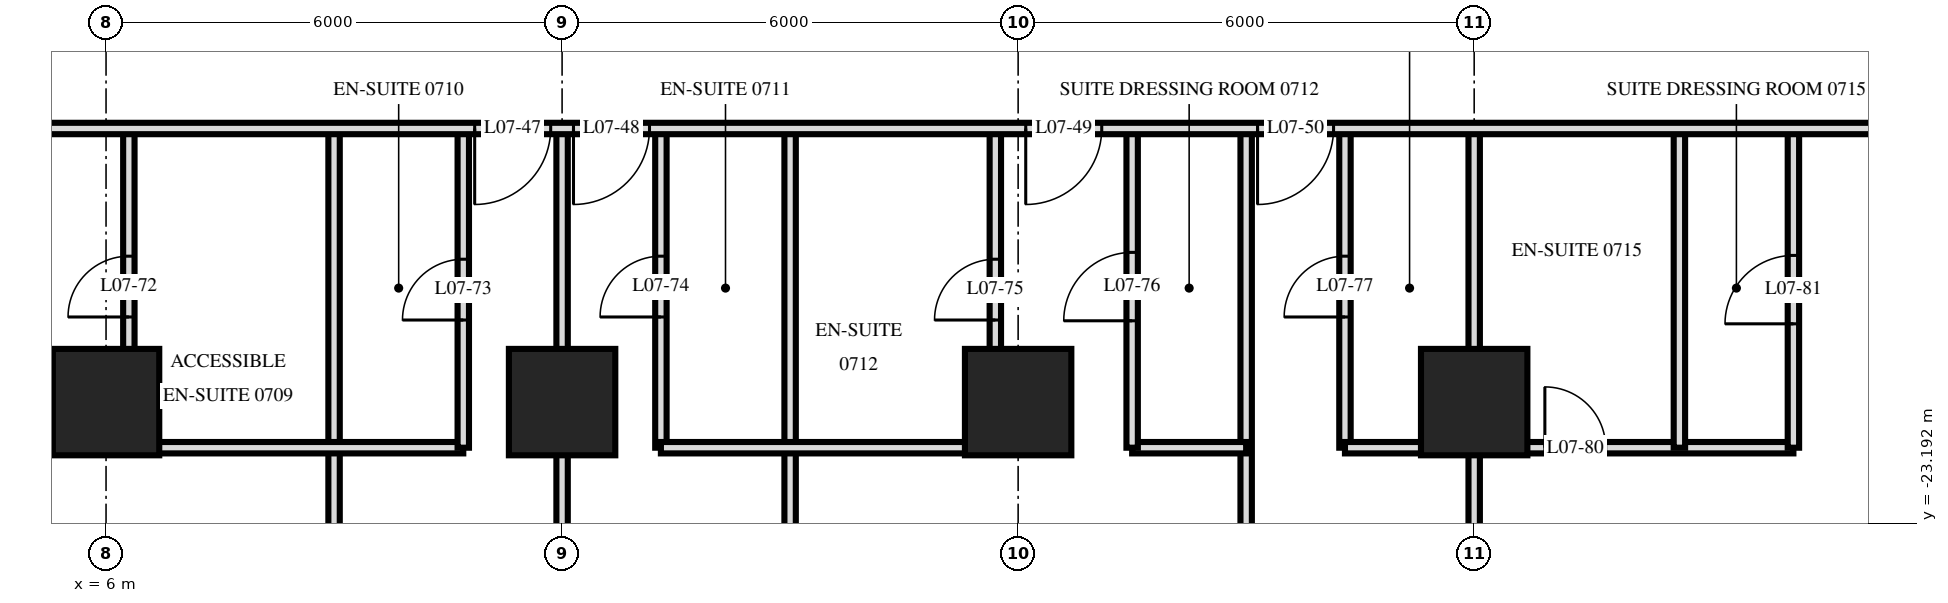
"""IFC4 building model, lengths in metres.
Left out: names, types, materials, properties, quantities, classifications, styles, units other than length and angle.
Written with IfcOpenShell. Run it as: python <this file> out.ifc"""

import sys

from ifc_helpers import new_model, si_unit, direction, frame, frame_2d, origin, origin_2d, place, context, subcontext, project, spatial, rectangle, extrude, element, fill, save


model = new_model("IFC4")
c1 = context("Model", 3, precision=1e-05, world=origin(), true_north=direction((0.0, 1.0)))
c2 = subcontext(c1, "Body", "Model", "MODEL_VIEW")
j1 = project(units=[si_unit("LENGTHUNIT", "METRE"), si_unit("PLANEANGLEUNIT", "RADIAN")], contexts=[c1])
p1 = place(None, origin())
s1 = spatial("IfcSite", under=j1, at=p1, CompositionType="ELEMENT")
p2 = place(p1, origin())
s2 = spatial("IfcBuilding", under=s1, at=p2, CompositionType="ELEMENT")
p3 = place(p2, frame((0.0, 0.0, 34.8)))
s3 = spatial("IfcBuildingStorey", under=s2, at=p3, CompositionType="ELEMENT", Elevation=34.8)
for number, where, z_axis, x_axis in (
    (1, (6.0, -21.6, 0.0), (0.0, 0.0, 1.0), (1.0, 0.0, 0.0)),
    (2, (12.0, -21.6, 0.0), (0.0, 0.0, 1.0), (1.0, 0.0, 0.0)),
    (3, (18.0, -21.6, 0.0), (0.0, 0.0, 1.0), (1.0, 0.0, 0.0)),
    (4, (24.0, -21.6, 0.0), (0.0, 0.0, 1.0), (1.0, 0.0, 0.0)),
):
    element("IfcColumn", number, at=place(p3, frame(where, z_axis=z_axis, x_axis=x_axis)), inside=s3, PredefinedType="COLUMN", context=c2, shape_type="SweptSolid", body=[
        extrude(rectangle(XDim=1.4, YDim=1.4, at=origin_2d()), origin(), (0.0, 0.0, 1.0), 3.6),
    ])
p4 = place(p3, frame((28.2, -22.2, 0.0), z_axis=(0.0, 0.0, 1.0), x_axis=(0.0, 1.0, 0.0)))
e5 = element("IfcWall", 5, at=p4, inside=s3, PredefinedType="PARTITIONING", context=c2, shape_type="SweptSolid", body=[
    extrude(rectangle(XDim=4.2, YDim=0.15, at=frame_2d((2.1, 0.0))), origin(), (0.0, 0.0, 1.0), 3.32),
])
p5 = place(p4, frame((1.63, 0.0, 0.0)))
e6 = element("IfcOpeningElement", 6, at=p5, cuts=e5, PredefinedType="OPENING", context=c2, shape_type="SweptSolid", body=[
    extrude(rectangle(XDim=0.9, YDim=2.1, at=frame_2d((0.45, 1.05))), frame((0.0, 0.085, 0.0), z_axis=(0.0, -1.0, 0.0), x_axis=(1.0, 0.0, 0.0)), (0.0, 0.0, 1.0), 0.17),
])
p6 = place(p3, frame((26.7, -22.2, 0.0), z_axis=(0.0, 0.0, 1.0), x_axis=(0.0, 1.0, 0.0)))
e7 = element("IfcWall", 7, at=p6, inside=s3, PredefinedType="PARTITIONING", context=c2, shape_type="SweptSolid", body=[
    extrude(rectangle(XDim=4.2, YDim=0.15, at=frame_2d((2.1, 0.0))), origin(), (0.0, 0.0, 1.0), 3.32),
])
p7 = place(p3, frame((24.0, -29.22, 0.0), z_axis=(0.0, 0.0, 1.0), x_axis=(0.0, 1.0, 0.0)))
e8 = element("IfcWall", 8, at=p7, inside=s3, PredefinedType="PARTITIONING", context=c2, shape_type="SweptSolid", body=[
    extrude(rectangle(XDim=11.22, YDim=0.15, at=frame_2d((5.61, 0.0))), origin(), (0.0, 0.0, 1.0), 3.32),
])
p8 = place(p3, frame((22.3, -22.2, 0.0), z_axis=(0.0, 0.0, 1.0), x_axis=(0.0, 1.0, 0.0)))
e9 = element("IfcWall", 9, at=p8, inside=s3, PredefinedType="PARTITIONING", context=c2, shape_type="SweptSolid", body=[
    extrude(rectangle(XDim=4.2, YDim=0.15, at=frame_2d((2.1, 0.0))), origin(), (0.0, 0.0, 1.0), 3.32),
])
p9 = place(p8, frame((1.72, 0.0, 0.0)))
e10 = element("IfcOpeningElement", 10, at=p9, cuts=e9, PredefinedType="OPENING", context=c2, shape_type="SweptSolid", body=[
    extrude(rectangle(XDim=0.8, YDim=2.1, at=frame_2d((0.4, 1.05))), frame((0.0, 0.085, 0.0), z_axis=(0.0, -1.0, 0.0), x_axis=(1.0, 0.0, 0.0)), (0.0, 0.0, 1.0), 0.17),
])
p10 = place(p3, frame((21.0, -29.22, 0.0), z_axis=(0.0, 0.0, 1.0), x_axis=(0.0, 1.0, 0.0)))
e11 = element("IfcWall", 11, at=p10, inside=s3, PredefinedType="PARTITIONING", context=c2, shape_type="SweptSolid", body=[
    extrude(rectangle(XDim=11.22, YDim=0.15, at=frame_2d((5.61, 0.0))), origin(), (0.0, 0.0, 1.0), 3.32),
])
p11 = place(p3, frame((19.5, -22.2, 0.0), z_axis=(0.0, 0.0, 1.0), x_axis=(0.0, 1.0, 0.0)))
e12 = element("IfcWall", 12, at=p11, inside=s3, PredefinedType="PARTITIONING", context=c2, shape_type="SweptSolid", body=[
    extrude(rectangle(XDim=4.2, YDim=0.15, at=frame_2d((2.1, 0.0))), origin(), (0.0, 0.0, 1.0), 3.32),
])
p12 = place(p11, frame((1.67, 0.0, 0.0)))
e13 = element("IfcOpeningElement", 13, at=p12, cuts=e12, PredefinedType="OPENING", context=c2, shape_type="SweptSolid", body=[
    extrude(rectangle(XDim=0.9, YDim=2.1, at=frame_2d((0.45, 1.05))), frame((0.0, 0.085, 0.0), z_axis=(0.0, -1.0, 0.0), x_axis=(1.0, 0.0, 0.0)), (0.0, 0.0, 1.0), 0.17),
])
p13 = place(p3, frame((17.7, -22.2, 0.0), z_axis=(0.0, 0.0, 1.0), x_axis=(0.0, 1.0, 0.0)))
e14 = element("IfcWall", 14, at=p13, inside=s3, PredefinedType="PARTITIONING", context=c2, shape_type="SweptSolid", body=[
    extrude(rectangle(XDim=4.2, YDim=0.15, at=frame_2d((2.1, 0.0))), origin(), (0.0, 0.0, 1.0), 3.32),
])
p14 = place(p13, frame((1.68, 0.0, 0.0)))
e15 = element("IfcOpeningElement", 15, at=p14, cuts=e14, PredefinedType="OPENING", context=c2, shape_type="SweptSolid", body=[
    extrude(rectangle(XDim=0.8, YDim=2.1, at=frame_2d((0.4, 1.05))), frame((0.0, 0.085, 0.0), z_axis=(0.0, -1.0, 0.0), x_axis=(1.0, 0.0, 0.0)), (0.0, 0.0, 1.0), 0.17),
])
p15 = place(p3, frame((15.0, -29.22, 0.0), z_axis=(0.0, 0.0, 1.0), x_axis=(0.0, 1.0, 0.0)))
e16 = element("IfcWall", 16, at=p15, inside=s3, PredefinedType="PARTITIONING", context=c2, shape_type="SweptSolid", body=[
    extrude(rectangle(XDim=11.22, YDim=0.15, at=frame_2d((5.61, 0.0))), origin(), (0.0, 0.0, 1.0), 3.32),
])
p16 = place(p3, frame((13.3, -22.2, 0.0), z_axis=(0.0, 0.0, 1.0), x_axis=(0.0, 1.0, 0.0)))
e17 = element("IfcWall", 17, at=p16, inside=s3, PredefinedType="PARTITIONING", context=c2, shape_type="SweptSolid", body=[
    extrude(rectangle(XDim=4.2, YDim=0.15, at=frame_2d((2.1, 0.0))), origin(), (0.0, 0.0, 1.0), 3.32),
])
p17 = place(p16, frame((1.72, 0.0, 0.0)))
e18 = element("IfcOpeningElement", 18, at=p17, cuts=e17, PredefinedType="OPENING", context=c2, shape_type="SweptSolid", body=[
    extrude(rectangle(XDim=0.8, YDim=2.1, at=frame_2d((0.4, 1.05))), frame((0.0, 0.085, 0.0), z_axis=(0.0, -1.0, 0.0), x_axis=(1.0, 0.0, 0.0)), (0.0, 0.0, 1.0), 0.17),
])
p18 = place(p3, frame((12.0, -29.22, 0.0), z_axis=(0.0, 0.0, 1.0), x_axis=(0.0, 1.0, 0.0)))
e19 = element("IfcWall", 19, at=p18, inside=s3, PredefinedType="PARTITIONING", context=c2, shape_type="SweptSolid", body=[
    extrude(rectangle(XDim=11.22, YDim=0.15, at=frame_2d((5.61, 0.0))), origin(), (0.0, 0.0, 1.0), 3.32),
])
p19 = place(p3, frame((10.7, -22.2, 0.0), z_axis=(0.0, 0.0, 1.0), x_axis=(0.0, 1.0, 0.0)))
e20 = element("IfcWall", 20, at=p19, inside=s3, PredefinedType="PARTITIONING", context=c2, shape_type="SweptSolid", body=[
    extrude(rectangle(XDim=4.2, YDim=0.15, at=frame_2d((2.1, 0.0))), origin(), (0.0, 0.0, 1.0), 3.32),
])
p20 = place(p19, frame((1.68, 0.0, 0.0)))
e21 = element("IfcOpeningElement", 21, at=p20, cuts=e20, PredefinedType="OPENING", context=c2, shape_type="SweptSolid", body=[
    extrude(rectangle(XDim=0.8, YDim=2.1, at=frame_2d((0.4, 1.05))), frame((0.0, 0.085, 0.0), z_axis=(0.0, -1.0, 0.0), x_axis=(1.0, 0.0, 0.0)), (0.0, 0.0, 1.0), 0.17),
])
p21 = place(p3, frame((9.0, -29.22, 0.0), z_axis=(0.0, 0.0, 1.0), x_axis=(0.0, 1.0, 0.0)))
e22 = element("IfcWall", 22, at=p21, inside=s3, PredefinedType="PARTITIONING", context=c2, shape_type="SweptSolid", body=[
    extrude(rectangle(XDim=11.22, YDim=0.15, at=frame_2d((5.61, 0.0))), origin(), (0.0, 0.0, 1.0), 3.32),
])
p22 = place(p3, frame((6.3, -22.2, 0.0), z_axis=(0.0, 0.0, 1.0), x_axis=(0.0, 1.0, 0.0)))
e23 = element("IfcWall", 23, at=p22, inside=s3, PredefinedType="PARTITIONING", context=c2, shape_type="SweptSolid", body=[
    extrude(rectangle(XDim=4.2, YDim=0.15, at=frame_2d((2.1, 0.0))), origin(), (0.0, 0.0, 1.0), 3.32),
])
p23 = place(p22, frame((1.72, 0.0, 0.0)))
e24 = element("IfcOpeningElement", 24, at=p23, cuts=e23, PredefinedType="OPENING", context=c2, shape_type="SweptSolid", body=[
    extrude(rectangle(XDim=0.8, YDim=2.1, at=frame_2d((0.4, 1.05))), frame((0.0, 0.085, 0.0), z_axis=(0.0, -1.0, 0.0), x_axis=(1.0, 0.0, 0.0)), (0.0, 0.0, 1.0), 0.17),
])
for number, where, z_axis, x_axis in (
    (25, (6.3, -22.2, 0.0), (0.0, 0.0, 1.0), (1.0, 0.0, 0.0)),
    (26, (13.3, -22.2, 0.0), (0.0, 0.0, 1.0), (1.0, 0.0, 0.0)),
):
    element("IfcWall", number, at=place(p3, frame(where, z_axis=z_axis, x_axis=x_axis)), inside=s3, PredefinedType="PARTITIONING", context=c2, shape_type="SweptSolid", body=[
        extrude(rectangle(XDim=4.4, YDim=0.15, at=frame_2d((2.2, 0.0))), origin(), (0.0, 0.0, 1.0), 3.32),
    ])
p24 = place(p3, frame((19.5, -22.2, 0.0), z_axis=(0.0, 0.0, 1.0), x_axis=(1.0, 0.0, 0.0)))
e27 = element("IfcWall", 27, at=p24, inside=s3, PredefinedType="PARTITIONING", context=c2, shape_type="SweptSolid", body=[
    extrude(rectangle(XDim=1.5, YDim=0.15, at=frame_2d((0.75, 0.0))), origin(), (0.0, 0.0, 1.0), 3.32),
])
p25 = place(p3, frame((22.3, -22.2, 0.0), z_axis=(0.0, 0.0, 1.0), x_axis=(1.0, 0.0, 0.0)))
e28 = element("IfcWall", 28, at=p25, inside=s3, PredefinedType="PARTITIONING", context=c2, shape_type="SweptSolid", body=[
    extrude(rectangle(XDim=5.9, YDim=0.15, at=frame_2d((2.95, 0.0))), origin(), (0.0, 0.0, 1.0), 3.32),
])
p26 = place(p25, frame((2.63, 0.0, 0.0)))
e29 = element("IfcOpeningElement", 29, at=p26, cuts=e28, PredefinedType="OPENING", context=c2, shape_type="SweptSolid", body=[
    extrude(rectangle(XDim=0.8, YDim=2.1, at=frame_2d((0.4, 1.05))), frame((0.0, 0.085, 0.0), z_axis=(0.0, -1.0, 0.0), x_axis=(1.0, 0.0, 0.0)), (0.0, 0.0, 1.0), 0.17),
])
p27 = place(p3, frame((-33.12, -18.0, 0.0), z_axis=(0.0, 0.0, 1.0), x_axis=(1.0, 0.0, 0.0)))
e30 = element("IfcWall", 30, at=p27, inside=s3, PredefinedType="PARTITIONING", context=c2, shape_type="SweptSolid", body=[
    extrude(rectangle(XDim=66.24, YDim=0.15, at=frame_2d((33.12, 0.0))), origin(), (0.0, 0.0, 1.0), 3.32),
])
p28 = place(p27, frame((12.27, 0.0, 0.0)))
e31 = element("IfcOpeningElement", 31, at=p28, cuts=e30, PredefinedType="OPENING", context=c2, shape_type="SweptSolid", body=[
    extrude(rectangle(XDim=1.0, YDim=2.1, at=frame_2d((0.5, 1.05))), frame((0.0, 0.085, 0.0), z_axis=(0.0, -1.0, 0.0), x_axis=(1.0, 0.0, 0.0)), (0.0, 0.0, 1.0), 0.17),
])
p29 = place(p27, frame((16.97, 0.0, 0.0)))
e32 = element("IfcOpeningElement", 32, at=p29, cuts=e30, PredefinedType="OPENING", context=c2, shape_type="SweptSolid", body=[
    extrude(rectangle(XDim=1.0, YDim=2.1, at=frame_2d((0.5, 1.05))), frame((0.0, 0.085, 0.0), z_axis=(0.0, -1.0, 0.0), x_axis=(1.0, 0.0, 0.0)), (0.0, 0.0, 1.0), 0.17),
])
p30 = place(p27, frame((18.27, 0.0, 0.0)))
e33 = element("IfcOpeningElement", 33, at=p30, cuts=e30, PredefinedType="OPENING", context=c2, shape_type="SweptSolid", body=[
    extrude(rectangle(XDim=1.0, YDim=2.1, at=frame_2d((0.5, 1.05))), frame((0.0, 0.085, 0.0), z_axis=(0.0, -1.0, 0.0), x_axis=(1.0, 0.0, 0.0)), (0.0, 0.0, 1.0), 0.17),
])
p31 = place(p27, frame((22.97, 0.0, 0.0)))
e34 = element("IfcOpeningElement", 34, at=p31, cuts=e30, PredefinedType="OPENING", context=c2, shape_type="SweptSolid", body=[
    extrude(rectangle(XDim=1.0, YDim=2.1, at=frame_2d((0.5, 1.05))), frame((0.0, 0.085, 0.0), z_axis=(0.0, -1.0, 0.0), x_axis=(1.0, 0.0, 0.0)), (0.0, 0.0, 1.0), 0.17),
])
p32 = place(p27, frame((24.27, 0.0, 0.0)))
e35 = element("IfcOpeningElement", 35, at=p32, cuts=e30, PredefinedType="OPENING", context=c2, shape_type="SweptSolid", body=[
    extrude(rectangle(XDim=1.0, YDim=2.1, at=frame_2d((0.5, 1.05))), frame((0.0, 0.085, 0.0), z_axis=(0.0, -1.0, 0.0), x_axis=(1.0, 0.0, 0.0)), (0.0, 0.0, 1.0), 0.17),
])
p33 = place(p27, frame((28.97, 0.0, 0.0)))
e36 = element("IfcOpeningElement", 36, at=p33, cuts=e30, PredefinedType="OPENING", context=c2, shape_type="SweptSolid", body=[
    extrude(rectangle(XDim=1.0, YDim=2.1, at=frame_2d((0.5, 1.05))), frame((0.0, 0.085, 0.0), z_axis=(0.0, -1.0, 0.0), x_axis=(1.0, 0.0, 0.0)), (0.0, 0.0, 1.0), 0.17),
])
p34 = place(p27, frame((30.27, 0.0, 0.0)))
e37 = element("IfcOpeningElement", 37, at=p34, cuts=e30, PredefinedType="OPENING", context=c2, shape_type="SweptSolid", body=[
    extrude(rectangle(XDim=1.0, YDim=2.1, at=frame_2d((0.5, 1.05))), frame((0.0, 0.085, 0.0), z_axis=(0.0, -1.0, 0.0), x_axis=(1.0, 0.0, 0.0)), (0.0, 0.0, 1.0), 0.17),
])
p35 = place(p27, frame((34.97, 0.0, 0.0)))
e38 = element("IfcOpeningElement", 38, at=p35, cuts=e30, PredefinedType="OPENING", context=c2, shape_type="SweptSolid", body=[
    extrude(rectangle(XDim=1.0, YDim=2.1, at=frame_2d((0.5, 1.05))), frame((0.0, 0.085, 0.0), z_axis=(0.0, -1.0, 0.0), x_axis=(1.0, 0.0, 0.0)), (0.0, 0.0, 1.0), 0.17),
])
p36 = place(p27, frame((37.27, 0.0, 0.0)))
e39 = element("IfcOpeningElement", 39, at=p36, cuts=e30, PredefinedType="OPENING", context=c2, shape_type="SweptSolid", body=[
    extrude(rectangle(XDim=1.0, YDim=2.1, at=frame_2d((0.5, 1.05))), frame((0.0, 0.085, 0.0), z_axis=(0.0, -1.0, 0.0), x_axis=(1.0, 0.0, 0.0)), (0.0, 0.0, 1.0), 0.17),
])
p37 = place(p27, frame((43.97, 0.0, 0.0)))
e40 = element("IfcOpeningElement", 40, at=p37, cuts=e30, PredefinedType="OPENING", context=c2, shape_type="SweptSolid", body=[
    extrude(rectangle(XDim=1.0, YDim=2.1, at=frame_2d((0.5, 1.05))), frame((0.0, 0.085, 0.0), z_axis=(0.0, -1.0, 0.0), x_axis=(1.0, 0.0, 0.0)), (0.0, 0.0, 1.0), 0.17),
])
p38 = place(p27, frame((45.27, 0.0, 0.0)))
e41 = element("IfcOpeningElement", 41, at=p38, cuts=e30, PredefinedType="OPENING", context=c2, shape_type="SweptSolid", body=[
    extrude(rectangle(XDim=1.0, YDim=2.1, at=frame_2d((0.5, 1.05))), frame((0.0, 0.085, 0.0), z_axis=(0.0, -1.0, 0.0), x_axis=(1.0, 0.0, 0.0)), (0.0, 0.0, 1.0), 0.17),
])
p39 = place(p27, frame((51.22, 0.0, 0.0)))
e42 = element("IfcOpeningElement", 42, at=p39, cuts=e30, PredefinedType="OPENING", context=c2, shape_type="SweptSolid", body=[
    extrude(rectangle(XDim=1.0, YDim=2.1, at=frame_2d((0.5, 1.05))), frame((0.0, 0.085, 0.0), z_axis=(0.0, -1.0, 0.0), x_axis=(1.0, 0.0, 0.0)), (0.0, 0.0, 1.0), 0.17),
])
p40 = place(p27, frame((54.27, 0.0, 0.0)))
e43 = element("IfcOpeningElement", 43, at=p40, cuts=e30, PredefinedType="OPENING", context=c2, shape_type="SweptSolid", body=[
    extrude(rectangle(XDim=1.0, YDim=2.1, at=frame_2d((0.5, 1.05))), frame((0.0, 0.085, 0.0), z_axis=(0.0, -1.0, 0.0), x_axis=(1.0, 0.0, 0.0)), (0.0, 0.0, 1.0), 0.17),
])
p41 = place(p27, frame((6.07, 0.0, 0.0)))
e44 = element("IfcOpeningElement", 44, at=p41, cuts=e30, PredefinedType="OPENING", context=c2, shape_type="SweptSolid", body=[
    extrude(rectangle(XDim=1.0, YDim=2.1, at=frame_2d((0.5, 1.05))), frame((0.0, 0.085, 0.0), z_axis=(0.0, -1.0, 0.0), x_axis=(1.0, 0.0, 0.0)), (0.0, 0.0, 1.0), 0.17),
])
p42 = place(p27, frame((63.37, 0.0, 0.0)))
e45 = element("IfcOpeningElement", 45, at=p42, cuts=e30, PredefinedType="OPENING", context=c2, shape_type="SweptSolid", body=[
    extrude(rectangle(XDim=1.0, YDim=2.1, at=frame_2d((0.5, 1.05))), frame((0.0, 0.085, 0.0), z_axis=(0.0, -1.0, 0.0), x_axis=(1.0, 0.0, 0.0)), (0.0, 0.0, 1.0), 0.17),
])
p43 = place(p37, frame((0.5, 0.0, 0.0), z_axis=(0.0, 0.0, 1.0), x_axis=(-1.0, 0.0, 0.0)))
e46 = element("IfcDoor", 46, at=p43, inside=s3, OperationType="SINGLE_SWING_LEFT", PredefinedType="DOOR", context=c2, shape_type="SweptSolid", body=[
    extrude(rectangle(XDim=1.0, YDim=2.1, at=frame_2d((0.0, 1.05))), frame((0.0, -0.025, 0.0), z_axis=(0.0, 1.0, 0.0), x_axis=(-1.0, 0.0, 0.0)), (0.0, 0.0, 1.0), 0.05),
])
fill(e40, e46)
p44 = place(p38, frame((0.5, 0.0, 0.0), z_axis=(0.0, 0.0, 1.0), x_axis=(-1.0, 0.0, 0.0)))
e47 = element("IfcDoor", 47, at=p44, inside=s3, OperationType="SINGLE_SWING_LEFT", PredefinedType="DOOR", context=c2, shape_type="SweptSolid", body=[
    extrude(rectangle(XDim=1.0, YDim=2.1, at=frame_2d((0.0, 1.05))), frame((0.0, -0.025, 0.0), z_axis=(0.0, 1.0, 0.0), x_axis=(-1.0, 0.0, 0.0)), (0.0, 0.0, 1.0), 0.05),
])
fill(e41, e47)
p45 = place(p39, frame((0.5, 0.0, 0.0), z_axis=(0.0, 0.0, 1.0), x_axis=(-1.0, 0.0, 0.0)))
e48 = element("IfcDoor", 48, at=p45, inside=s3, OperationType="SINGLE_SWING_LEFT", PredefinedType="DOOR", context=c2, shape_type="SweptSolid", body=[
    extrude(rectangle(XDim=1.0, YDim=2.1, at=frame_2d((0.0, 1.05))), frame((0.0, -0.025, 0.0), z_axis=(0.0, 1.0, 0.0), x_axis=(-1.0, 0.0, 0.0)), (0.0, 0.0, 1.0), 0.05),
])
fill(e42, e48)
p46 = place(p40, frame((0.5, 0.0, 0.0), z_axis=(0.0, 0.0, 1.0), x_axis=(-1.0, 0.0, 0.0)))
e49 = element("IfcDoor", 49, at=p46, inside=s3, OperationType="SINGLE_SWING_LEFT", PredefinedType="DOOR", context=c2, shape_type="SweptSolid", body=[
    extrude(rectangle(XDim=1.0, YDim=2.1, at=frame_2d((0.0, 1.05))), frame((0.0, -0.025, 0.0), z_axis=(0.0, 1.0, 0.0), x_axis=(-1.0, 0.0, 0.0)), (0.0, 0.0, 1.0), 0.05),
])
fill(e43, e49)
p47 = place(p23, origin())
e50 = element("IfcDoor", 50, at=p47, inside=s3, OperationType="SINGLE_SWING_RIGHT", PredefinedType="DOOR", context=c2, shape_type="SweptSolid", body=[
    extrude(rectangle(XDim=0.8, YDim=2.1, at=frame_2d((0.4, 1.05))), frame((0.0, 0.025, 0.0), z_axis=(0.0, -1.0, 0.0), x_axis=(1.0, 0.0, 0.0)), (0.0, 0.0, 1.0), 0.05),
])
fill(e24, e50)
p48 = place(p20, origin())
e51 = element("IfcDoor", 51, at=p48, inside=s3, OperationType="SINGLE_SWING_RIGHT", PredefinedType="DOOR", context=c2, shape_type="SweptSolid", body=[
    extrude(rectangle(XDim=0.8, YDim=2.1, at=frame_2d((0.4, 1.05))), frame((0.0, 0.025, 0.0), z_axis=(0.0, -1.0, 0.0), x_axis=(1.0, 0.0, 0.0)), (0.0, 0.0, 1.0), 0.05),
])
fill(e21, e51)
p49 = place(p17, origin())
e52 = element("IfcDoor", 52, at=p49, inside=s3, OperationType="SINGLE_SWING_RIGHT", PredefinedType="DOOR", context=c2, shape_type="SweptSolid", body=[
    extrude(rectangle(XDim=0.8, YDim=2.1, at=frame_2d((0.4, 1.05))), frame((0.0, 0.025, 0.0), z_axis=(0.0, -1.0, 0.0), x_axis=(1.0, 0.0, 0.0)), (0.0, 0.0, 1.0), 0.05),
])
fill(e18, e52)
p50 = place(p14, origin())
e53 = element("IfcDoor", 53, at=p50, inside=s3, OperationType="SINGLE_SWING_RIGHT", PredefinedType="DOOR", context=c2, shape_type="SweptSolid", body=[
    extrude(rectangle(XDim=0.8, YDim=2.1, at=frame_2d((0.4, 1.05))), frame((0.0, 0.025, 0.0), z_axis=(0.0, -1.0, 0.0), x_axis=(1.0, 0.0, 0.0)), (0.0, 0.0, 1.0), 0.05),
])
fill(e15, e53)
p51 = place(p12, origin())
e54 = element("IfcDoor", 54, at=p51, inside=s3, OperationType="SINGLE_SWING_RIGHT", PredefinedType="DOOR", context=c2, shape_type="SweptSolid", body=[
    extrude(rectangle(XDim=0.9, YDim=2.1, at=frame_2d((0.45, 1.05))), frame((0.0, 0.025, 0.0), z_axis=(0.0, -1.0, 0.0), x_axis=(1.0, 0.0, 0.0)), (0.0, 0.0, 1.0), 0.05),
])
fill(e13, e54)
p52 = place(p9, origin())
e55 = element("IfcDoor", 55, at=p52, inside=s3, OperationType="SINGLE_SWING_RIGHT", PredefinedType="DOOR", context=c2, shape_type="SweptSolid", body=[
    extrude(rectangle(XDim=0.8, YDim=2.1, at=frame_2d((0.4, 1.05))), frame((0.0, 0.025, 0.0), z_axis=(0.0, -1.0, 0.0), x_axis=(1.0, 0.0, 0.0)), (0.0, 0.0, 1.0), 0.05),
])
fill(e10, e55)
p53 = place(p26, origin())
e56 = element("IfcDoor", 56, at=p53, inside=s3, OperationType="SINGLE_SWING_RIGHT", PredefinedType="DOOR", context=c2, shape_type="SweptSolid", body=[
    extrude(rectangle(XDim=0.8, YDim=2.1, at=frame_2d((0.4, 1.05))), frame((0.0, 0.025, 0.0), z_axis=(0.0, -1.0, 0.0), x_axis=(1.0, 0.0, 0.0)), (0.0, 0.0, 1.0), 0.05),
])
fill(e29, e56)
p54 = place(p5, origin())
e57 = element("IfcDoor", 57, at=p54, inside=s3, OperationType="SINGLE_SWING_RIGHT", PredefinedType="DOOR", context=c2, shape_type="SweptSolid", body=[
    extrude(rectangle(XDim=0.9, YDim=2.1, at=frame_2d((0.45, 1.05))), frame((0.0, 0.025, 0.0), z_axis=(0.0, -1.0, 0.0), x_axis=(1.0, 0.0, 0.0)), (0.0, 0.0, 1.0), 0.05),
])
fill(e6, e57)
save(model, sys.argv[1])
